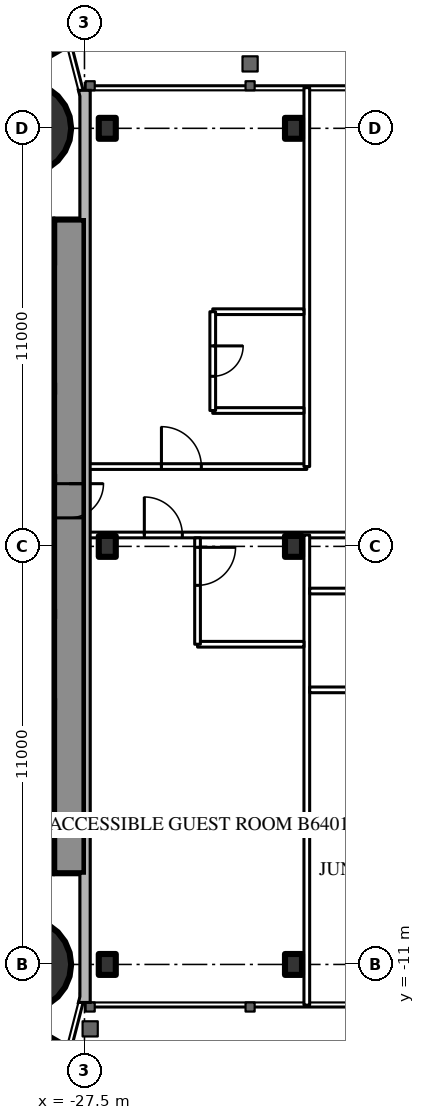
"""IFC4 building model, lengths in metres.
Left out: names, types, materials, properties, quantities, classifications, styles, units other than length and angle.
Written with IfcOpenShell. Run it as: python <this file> out.ifc"""

import sys

from ifc_helpers import new_model, si_unit, direction, frame, frame_2d, origin, origin_2d, place, context, subcontext, project, spatial, rectangle, circle, i_section, extrude, element, fill, save


model = new_model("IFC4")
c1 = context("Model", 3, precision=1e-05, world=origin(), true_north=direction((0.0, 1.0)))
c2 = subcontext(c1, "Body", "Model", "MODEL_VIEW")
j1 = project(units=[si_unit("LENGTHUNIT", "METRE"), si_unit("PLANEANGLEUNIT", "RADIAN")], contexts=[c1])
p1 = place(None, origin())
s1 = spatial("IfcSite", under=j1, at=p1, CompositionType="ELEMENT")
p2 = place(p1, origin())
s2 = spatial("IfcBuilding", under=s1, at=p2, CompositionType="ELEMENT")
p3 = place(p2, frame((0.0, 0.0, 240.5)))
s3 = spatial("IfcBuildingStorey", under=s2, at=p3, CompositionType="ELEMENT", Elevation=240.5)
for number, where, z_axis, x_axis in (
    (1, (-29.05, -11.0, 0.0), (0.0, 0.0, 1.0), (1.0, 0.0, 0.0)),
    (2, (-29.05, 11.0, 0.0), (0.0, 0.0, 1.0), (1.0, 0.0, 0.0)),
):
    element("IfcColumn", number, at=place(p3, frame(where, z_axis=z_axis, x_axis=x_axis)), inside=s3, PredefinedType="COLUMN", context=c2, shape_type="SweptSolid", body=[
        extrude(circle(Radius=1.2, at=origin_2d()), origin(), (0.0, 0.0, 1.0), 3.6),
    ])
p4 = place(p3, frame((-27.9, 8.6, 0.0), z_axis=(0.0, 0.0, 1.0), x_axis=(0.0, -1.0, 0.0)))
e3 = element("IfcWall", 3, at=p4, inside=s3, PredefinedType="SHEAR", context=c2, shape_type="SweptSolid", body=[
    extrude(rectangle(XDim=17.2, YDim=0.8, at=frame_2d((8.6, 0.0))), origin(), (0.0, 0.0, 1.0), 3.6),
])
p5 = place(p4, frame((6.95, 0.0, 0.0)))
e4 = element("IfcOpeningElement", 4, at=p5, cuts=e3, PredefinedType="OPENING", context=c2, shape_type="SweptSolid", body=[
    extrude(rectangle(XDim=0.9, YDim=2.2, at=frame_2d((0.45, 1.1))), frame((0.0, 0.41, 0.0), z_axis=(0.0, -1.0, 0.0), x_axis=(1.0, 0.0, 0.0)), (0.0, 0.0, 1.0), 0.82),
])
p6 = place(p3, frame((-28.3, 8.0, 0.0), z_axis=(0.0, 0.0, 1.0), x_axis=(-1.0, 0.0, 0.0)))
e5 = element("IfcWall", 5, at=p6, inside=s3, PredefinedType="SHEAR", context=c2, shape_type="SweptSolid", body=[
    extrude(rectangle(XDim=8.4, YDim=1.2, at=frame_2d((4.2, 0.0))), origin(), (0.0, 0.0, 1.0), 3.6),
])
p7 = place(p6, frame((0.25, 0.0, 0.0)))
e6 = element("IfcOpeningElement", 6, at=p7, cuts=e5, PredefinedType="OPENING", context=c2, shape_type="SweptSolid", body=[
    extrude(rectangle(XDim=1.0, YDim=2.2, at=frame_2d((0.5, 1.1))), frame((0.0, 0.61, 0.0), z_axis=(0.0, -1.0, 0.0), x_axis=(1.0, 0.0, 0.0)), (0.0, 0.0, 1.0), 1.22),
])
p8 = place(p3, frame((-28.3, -8.0, 0.0), z_axis=(0.0, 0.0, 1.0), x_axis=(-1.0, 0.0, 0.0)))
e7 = element("IfcWall", 7, at=p8, inside=s3, PredefinedType="SHEAR", context=c2, shape_type="SweptSolid", body=[
    extrude(rectangle(XDim=8.4, YDim=1.2, at=frame_2d((4.2, 0.0))), origin(), (0.0, 0.0, 1.0), 3.6),
])
p9 = place(p8, frame((0.25, 0.0, 0.0)))
e8 = element("IfcOpeningElement", 8, at=p9, cuts=e7, PredefinedType="OPENING", context=c2, shape_type="SweptSolid", body=[
    extrude(rectangle(XDim=1.0, YDim=2.2, at=frame_2d((0.5, 1.1))), frame((0.0, 0.61, 0.0), z_axis=(0.0, -1.0, 0.0), x_axis=(1.0, 0.0, 0.0)), (0.0, 0.0, 1.0), 1.22),
])
for number, where, z_axis, x_axis in (
    (9, (-28.3, 4.15, 0.0), (0.0, 0.0, 1.0), (-1.0, 0.0, 0.0)),
    (10, (-28.3, -4.15, 0.0), (0.0, 0.0, 1.0), (-1.0, 0.0, 0.0)),
):
    element("IfcWall", number, at=place(p3, frame(where, z_axis=z_axis, x_axis=x_axis)), inside=s3, PredefinedType="SHEAR", context=c2, shape_type="SweptSolid", body=[
        extrude(rectangle(XDim=8.4, YDim=0.3, at=frame_2d((4.2, 0.0))), origin(), (0.0, 0.0, 1.0), 3.6),
    ])
for number, where, z_axis, x_axis in (
    (11, (-28.3, 1.775, 0.0), (0.0, 0.0, 1.0), (-1.0, 0.0, 0.0)),
    (12, (-28.3, -1.775, 0.0), (0.0, 0.0, 1.0), (-1.0, 0.0, 0.0)),
):
    element("IfcWall", number, at=place(p3, frame(where, z_axis=z_axis, x_axis=x_axis)), inside=s3, PredefinedType="SHEAR", context=c2, shape_type="SweptSolid", body=[
        extrude(rectangle(XDim=2.9, YDim=0.25, at=frame_2d((1.45, 0.0))), origin(), (0.0, 0.0, 1.0), 3.6),
    ])
p10 = place(p3, frame((-27.2, 14.3, 0.0), z_axis=(0.0, 0.0, 1.0), x_axis=(-0.866026593062, -0.499997940104, 0.0)))
e13 = element("IfcWall", 13, at=p10, inside=s3, PredefinedType="SHEAR", context=c2, shape_type="SweptSolid", body=[
    extrude(rectangle(XDim=28.946, YDim=1.2, at=frame_2d((14.473, 0.0))), origin(), (0.0, 0.0, 1.0), 3.6),
])
p11 = place(p10, frame((4.6, 0.0, 0.0)))
e14 = element("IfcOpeningElement", 14, at=p11, cuts=e13, PredefinedType="OPENING", context=c2, shape_type="SweptSolid", body=[
    extrude(rectangle(XDim=1.0, YDim=2.2, at=frame_2d((0.5, 1.1))), frame((0.0, 0.61, 0.0), z_axis=(0.0, -1.0, 0.0), x_axis=(1.0, 0.0, 0.0)), (0.0, 0.0, 1.0), 1.22),
])
p12 = place(p10, frame((13.395, 0.0, 0.0)))
e15 = element("IfcOpeningElement", 15, at=p12, cuts=e13, PredefinedType="OPENING", context=c2, shape_type="SweptSolid", body=[
    extrude(rectangle(XDim=1.8, YDim=2.2, at=frame_2d((0.9, 1.1))), frame((0.0, 0.61, 0.0), z_axis=(0.0, -1.0, 0.0), x_axis=(1.0, 0.0, 0.0)), (0.0, 0.0, 1.0), 1.22),
])
p13 = place(p3, frame((-27.2, -14.3, 0.0), z_axis=(0.0, 0.0, 1.0), x_axis=(-0.866024021859, 0.500002393557, 0.0)))
e16 = element("IfcWall", 16, at=p13, inside=s3, PredefinedType="SHEAR", context=c2, shape_type="SweptSolid", body=[
    extrude(rectangle(XDim=27.907, YDim=1.2, at=frame_2d((13.954, 0.0))), origin(), (0.0, 0.0, 1.0), 3.6),
])
p14 = place(p13, frame((4.6, 0.0, 0.0)))
e17 = element("IfcOpeningElement", 17, at=p14, cuts=e16, PredefinedType="OPENING", context=c2, shape_type="SweptSolid", body=[
    extrude(rectangle(XDim=1.0, YDim=2.2, at=frame_2d((0.5, 1.1))), frame((0.0, 0.61, 0.0), z_axis=(0.0, -1.0, 0.0), x_axis=(1.0, 0.0, 0.0)), (0.0, 0.0, 1.0), 1.22),
])
p15 = place(p13, frame((13.395, 0.0, 0.0)))
e18 = element("IfcOpeningElement", 18, at=p15, cuts=e16, PredefinedType="OPENING", context=c2, shape_type="SweptSolid", body=[
    extrude(rectangle(XDim=1.8, YDim=2.2, at=frame_2d((0.9, 1.1))), frame((0.0, 0.61, 0.0), z_axis=(0.0, -1.0, 0.0), x_axis=(1.0, 0.0, 0.0)), (0.0, 0.0, 1.0), 1.22),
])
for number, where, z_axis, x_axis in (
    (19, (-26.9, -11.0, 0.0), (0.0, 0.0, 1.0), (1.0, 0.0, 0.0)),
    (20, (-22.0, -11.0, 0.0), (0.0, 0.0, 1.0), (1.0, 0.0, 0.0)),
    (21, (-26.9, 0.0, 0.0), (0.0, 0.0, 1.0), (1.0, 0.0, 0.0)),
    (22, (-22.0, 0.0, 0.0), (0.0, 0.0, 1.0), (1.0, 0.0, 0.0)),
    (23, (-26.9, 11.0, 0.0), (0.0, 0.0, 1.0), (1.0, 0.0, 0.0)),
    (24, (-22.0, 11.0, 0.0), (0.0, 0.0, 1.0), (1.0, 0.0, 0.0)),
):
    element("IfcColumn", number, at=place(p3, frame(where, z_axis=z_axis, x_axis=x_axis)), inside=s3, PredefinedType="COLUMN", context=c2, shape_type="SweptSolid", body=[
        extrude(i_section(OverallWidth=0.448, OverallDepth=0.55, WebThickness=0.072, FlangeThickness=0.115, FilletRadius=0.02, at=origin_2d()), origin(), (0.0, 0.0, 1.0), 3.6),
    ])
p16 = place(p3, frame((-27.5, 0.3, 0.0), z_axis=(0.0, 0.0, 1.0), x_axis=(1.0, 0.0, 0.0)))
e25 = element("IfcWall", 25, at=p16, inside=s3, PredefinedType="PARTITIONING", context=c2, shape_type="SweptSolid", body=[
    extrude(rectangle(XDim=55.0, YDim=0.15, at=frame_2d((27.5, 0.0))), origin(), (0.0, 0.0, 1.0), 2.4),
])
p17 = place(p16, frame((1.575, 0.0, 0.0)))
e26 = element("IfcOpeningElement", 26, at=p17, cuts=e25, PredefinedType="OPENING", context=c2, shape_type="SweptSolid", body=[
    extrude(rectangle(XDim=1.0, YDim=2.2, at=frame_2d((0.5, 1.1))), frame((0.0, 0.085, 0.0), z_axis=(0.0, -1.0, 0.0), x_axis=(1.0, 0.0, 0.0)), (0.0, 0.0, 1.0), 0.17),
])
p18 = place(p16, frame((8.525, 0.0, 0.0)))
e27 = element("IfcOpeningElement", 27, at=p18, cuts=e25, PredefinedType="OPENING", context=c2, shape_type="SweptSolid", body=[
    extrude(rectangle(XDim=1.05, YDim=2.4, at=frame_2d((0.525, 1.2))), frame((0.0, 0.085, 0.0), z_axis=(0.0, -1.0, 0.0), x_axis=(1.0, 0.0, 0.0)), (0.0, 0.0, 1.0), 0.17),
])
p19 = place(p16, frame((14.025, 0.0, 0.0)))
e28 = element("IfcOpeningElement", 28, at=p19, cuts=e25, PredefinedType="OPENING", context=c2, shape_type="SweptSolid", body=[
    extrude(rectangle(XDim=1.05, YDim=2.4, at=frame_2d((0.525, 1.2))), frame((0.0, 0.085, 0.0), z_axis=(0.0, -1.0, 0.0), x_axis=(1.0, 0.0, 0.0)), (0.0, 0.0, 1.0), 0.17),
])
p20 = place(p16, frame((25.025, 0.0, 0.0)))
e29 = element("IfcOpeningElement", 29, at=p20, cuts=e25, PredefinedType="OPENING", context=c2, shape_type="SweptSolid", body=[
    extrude(rectangle(XDim=1.05, YDim=2.4, at=frame_2d((0.525, 1.2))), frame((0.0, 0.085, 0.0), z_axis=(0.0, -1.0, 0.0), x_axis=(1.0, 0.0, 0.0)), (0.0, 0.0, 1.0), 0.17),
])
p21 = place(p16, frame((30.525, 0.0, 0.0)))
e30 = element("IfcOpeningElement", 30, at=p21, cuts=e25, PredefinedType="OPENING", context=c2, shape_type="SweptSolid", body=[
    extrude(rectangle(XDim=1.05, YDim=2.4, at=frame_2d((0.525, 1.2))), frame((0.0, 0.085, 0.0), z_axis=(0.0, -1.0, 0.0), x_axis=(1.0, 0.0, 0.0)), (0.0, 0.0, 1.0), 0.17),
])
p22 = place(p16, frame((41.525, 0.0, 0.0)))
e31 = element("IfcOpeningElement", 31, at=p22, cuts=e25, PredefinedType="OPENING", context=c2, shape_type="SweptSolid", body=[
    extrude(rectangle(XDim=1.05, YDim=2.4, at=frame_2d((0.525, 1.2))), frame((0.0, 0.085, 0.0), z_axis=(0.0, -1.0, 0.0), x_axis=(1.0, 0.0, 0.0)), (0.0, 0.0, 1.0), 0.17),
])
p23 = place(p16, frame((47.025, 0.0, 0.0)))
e32 = element("IfcOpeningElement", 32, at=p23, cuts=e25, PredefinedType="OPENING", context=c2, shape_type="SweptSolid", body=[
    extrude(rectangle(XDim=1.05, YDim=2.4, at=frame_2d((0.525, 1.2))), frame((0.0, 0.085, 0.0), z_axis=(0.0, -1.0, 0.0), x_axis=(1.0, 0.0, 0.0)), (0.0, 0.0, 1.0), 0.17),
])
p24 = place(p16, frame((52.525, 0.0, 0.0)))
e33 = element("IfcOpeningElement", 33, at=p24, cuts=e25, PredefinedType="OPENING", context=c2, shape_type="SweptSolid", body=[
    extrude(rectangle(XDim=1.05, YDim=2.4, at=frame_2d((0.525, 1.2))), frame((0.0, 0.085, 0.0), z_axis=(0.0, -1.0, 0.0), x_axis=(1.0, 0.0, 0.0)), (0.0, 0.0, 1.0), 0.17),
])
p25 = place(p3, frame((-27.5, 2.1, 0.0), z_axis=(0.0, 0.0, 1.0), x_axis=(1.0, 0.0, 0.0)))
e34 = element("IfcWall", 34, at=p25, inside=s3, PredefinedType="PARTITIONING", context=c2, shape_type="SweptSolid", body=[
    extrude(rectangle(XDim=5.85, YDim=0.15, at=frame_2d((2.925, 0.0))), origin(), (0.0, 0.0, 1.0), 3.4),
])
p26 = place(p25, frame((2.025, 0.0, 0.0)))
e35 = element("IfcOpeningElement", 35, at=p26, cuts=e34, PredefinedType="OPENING", context=c2, shape_type="SweptSolid", body=[
    extrude(rectangle(XDim=1.05, YDim=2.4, at=frame_2d((0.525, 1.2))), frame((0.0, 0.085, 0.0), z_axis=(0.0, -1.0, 0.0), x_axis=(1.0, 0.0, 0.0)), (0.0, 0.0, 1.0), 0.17),
])
p27 = place(p3, frame((-21.65, -12.07, 0.0), z_axis=(0.0, 0.0, 1.0), x_axis=(0.0, 1.0, 0.0)))
e36 = element("IfcWall", 36, at=p27, inside=s3, PredefinedType="PARTITIONING", context=c2, shape_type="SweptSolid", body=[
    extrude(rectangle(XDim=12.37, YDim=0.15, at=frame_2d((6.185, 0.0))), origin(), (0.0, 0.0, 1.0), 3.4),
])
p28 = place(p3, frame((-24.525, -2.575, 0.0), z_axis=(0.0, 0.0, 1.0), x_axis=(1.0, 0.0, 0.0)))
e37 = element("IfcWall", 37, at=p28, inside=s3, PredefinedType="PARTITIONING", context=c2, shape_type="SweptSolid", body=[
    extrude(rectangle(XDim=2.8, YDim=0.15, at=frame_2d((1.4, 0.0))), origin(), (0.0, 0.0, 1.0), 3.4),
])
p29 = place(p3, frame((-24.525, -2.575, 0.0), z_axis=(0.0, 0.0, 1.0), x_axis=(0.0, 1.0, 0.0)))
e38 = element("IfcWall", 38, at=p29, inside=s3, PredefinedType="PARTITIONING", context=c2, shape_type="SweptSolid", body=[
    extrude(rectangle(XDim=2.8, YDim=0.15, at=frame_2d((1.4, 0.0))), origin(), (0.0, 0.0, 1.0), 3.4),
])
p30 = place(p29, frame((1.55, 0.0, 0.0)))
e39 = element("IfcOpeningElement", 39, at=p30, cuts=e38, PredefinedType="OPENING", context=c2, shape_type="SweptSolid", body=[
    extrude(rectangle(XDim=1.0, YDim=2.2, at=frame_2d((0.5, 1.1))), frame((0.0, 0.085, 0.0), z_axis=(0.0, -1.0, 0.0), x_axis=(1.0, 0.0, 0.0)), (0.0, 0.0, 1.0), 0.17),
])
for number, where, z_axis, x_axis in (
    (40, (-21.575, -3.775, 0.0), (0.0, 0.0, 1.0), (1.0, 0.0, 0.0)),
    (41, (-21.575, -1.175, 0.0), (0.0, 0.0, 1.0), (1.0, 0.0, 0.0)),
):
    element("IfcWall", number, at=place(p3, frame(where, z_axis=z_axis, x_axis=x_axis)), inside=s3, PredefinedType="PARTITIONING", context=c2, shape_type="SweptSolid", body=[
        extrude(rectangle(XDim=2.4, YDim=0.15, at=frame_2d((1.2, 0.0))), origin(), (0.0, 0.0, 1.0), 3.4),
    ])
p31 = place(p3, frame((-21.65, 2.1, 0.0), z_axis=(0.0, 0.0, 1.0), x_axis=(0.0, 1.0, 0.0)))
e42 = element("IfcWall", 42, at=p31, inside=s3, PredefinedType="PARTITIONING", context=c2, shape_type="SweptSolid", body=[
    extrude(rectangle(XDim=9.97, YDim=0.15, at=frame_2d((4.985, 0.0))), origin(), (0.0, 0.0, 1.0), 3.4),
])
for number, where, z_axis, x_axis in (
    (43, (-24.125, 6.175, 0.0), (0.0, 0.0, 1.0), (1.0, 0.0, 0.0)),
    (44, (-24.125, 3.575, 0.0), (0.0, 0.0, 1.0), (1.0, 0.0, 0.0)),
):
    element("IfcWall", number, at=place(p3, frame(where, z_axis=z_axis, x_axis=x_axis)), inside=s3, PredefinedType="PARTITIONING", context=c2, shape_type="SweptSolid", body=[
        extrude(rectangle(XDim=2.4, YDim=0.15, at=frame_2d((1.2, 0.0))), origin(), (0.0, 0.0, 1.0), 3.4),
    ])
p32 = place(p3, frame((-24.125, 3.575, 0.0), z_axis=(0.0, 0.0, 1.0), x_axis=(0.0, 1.0, 0.0)))
e45 = element("IfcWall", 45, at=p32, inside=s3, PredefinedType="PARTITIONING", context=c2, shape_type="SweptSolid", body=[
    extrude(rectangle(XDim=2.6, YDim=0.15, at=frame_2d((1.3, 0.0))), origin(), (0.0, 0.0, 1.0), 3.4),
])
p33 = place(p32, frame((0.9, 0.0, 0.0)))
e46 = element("IfcOpeningElement", 46, at=p33, cuts=e45, PredefinedType="OPENING", context=c2, shape_type="SweptSolid", body=[
    extrude(rectangle(XDim=0.8, YDim=2.2, at=frame_2d((0.4, 1.1))), frame((0.0, 0.085, 0.0), z_axis=(0.0, -1.0, 0.0), x_axis=(1.0, 0.0, 0.0)), (0.0, 0.0, 1.0), 0.17),
])
p34 = place(p5, origin())
e47 = element("IfcDoor", 47, at=p34, inside=s3, OperationType="SINGLE_SWING_LEFT", PredefinedType="DOOR", context=c2, shape_type="SweptSolid", body=[
    extrude(rectangle(XDim=0.9, YDim=2.2, at=frame_2d((0.45, 1.1))), frame((0.0, 0.025, 0.0), z_axis=(0.0, -1.0, 0.0), x_axis=(1.0, 0.0, 0.0)), (0.0, 0.0, 1.0), 0.05),
])
fill(e4, e47)
p35 = place(p30, origin())
e48 = element("IfcDoor", 48, at=p35, inside=s3, OperationType="SINGLE_SWING_RIGHT", PredefinedType="DOOR", context=c2, shape_type="SweptSolid", body=[
    extrude(rectangle(XDim=1.0, YDim=2.2, at=frame_2d((0.5, 1.1))), frame((0.0, 0.025, 0.0), z_axis=(0.0, -1.0, 0.0), x_axis=(1.0, 0.0, 0.0)), (0.0, 0.0, 1.0), 0.05),
])
fill(e39, e48)
p36 = place(p17, origin())
e49 = element("IfcDoor", 49, at=p36, inside=s3, OperationType="SINGLE_SWING_LEFT", PredefinedType="DOOR", context=c2, shape_type="SweptSolid", body=[
    extrude(rectangle(XDim=1.0, YDim=2.2, at=frame_2d((0.5, 1.1))), frame((0.0, 0.025, 0.0), z_axis=(0.0, -1.0, 0.0), x_axis=(1.0, 0.0, 0.0)), (0.0, 0.0, 1.0), 0.05),
])
fill(e26, e49)
p37 = place(p33, origin())
e50 = element("IfcDoor", 50, at=p37, inside=s3, OperationType="SINGLE_SWING_RIGHT", PredefinedType="DOOR", context=c2, shape_type="SweptSolid", body=[
    extrude(rectangle(XDim=0.8, YDim=2.2, at=frame_2d((0.4, 1.1))), frame((0.0, 0.025, 0.0), z_axis=(0.0, -1.0, 0.0), x_axis=(1.0, 0.0, 0.0)), (0.0, 0.0, 1.0), 0.05),
])
fill(e46, e50)
p38 = place(p26, origin())
e51 = element("IfcDoor", 51, at=p38, inside=s3, OperationType="SINGLE_SWING_LEFT", PredefinedType="DOOR", context=c2, shape_type="SweptSolid", body=[
    extrude(rectangle(XDim=1.05, YDim=2.4, at=frame_2d((0.525, 1.2))), frame((0.0, 0.025, 0.0), z_axis=(0.0, -1.0, 0.0), x_axis=(1.0, 0.0, 0.0)), (0.0, 0.0, 1.0), 0.05),
])
fill(e35, e51)
save(model, sys.argv[1])
